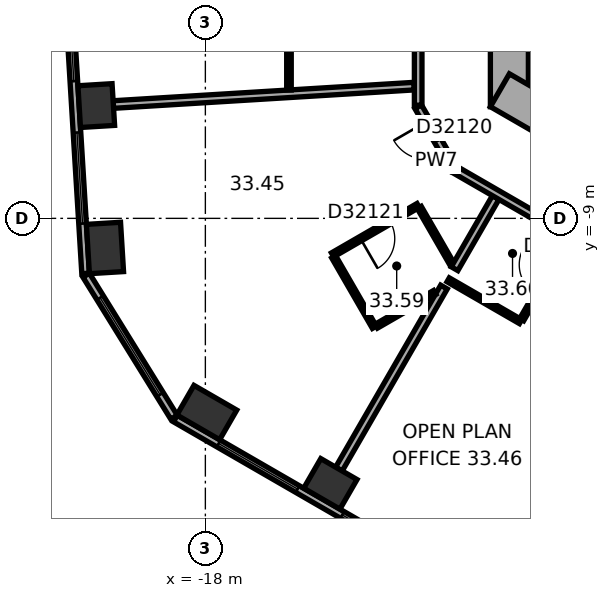
"""IFC4 building model, lengths in metres.
Left out: names, types, materials, properties, quantities, classifications, styles, units other than length and angle.
Written with IfcOpenShell. Run it as: python <this file> out.ifc"""

import sys

from ifc_helpers import new_model, si_unit, direction, frame, frame_2d, origin, origin_2d, place, context, subcontext, project, spatial, rectangle, extrude, element, fill, save


model = new_model("IFC4")
c1 = context("Model", 3, precision=1e-05, world=origin(), true_north=direction((0.0, 1.0)))
c2 = subcontext(c1, "Body", "Model", "MODEL_VIEW")
j1 = project(units=[si_unit("LENGTHUNIT", "METRE"), si_unit("PLANEANGLEUNIT", "RADIAN")], contexts=[c1])
p1 = place(None, origin())
s1 = spatial("IfcSite", under=j1, at=p1, CompositionType="ELEMENT")
p2 = place(p1, origin())
s2 = spatial("IfcBuilding", under=s1, at=p2, CompositionType="ELEMENT")
p3 = place(p2, frame((0.0, 0.0, 135.5)))
s3 = spatial("IfcBuildingStorey", under=s2, at=p3, CompositionType="ELEMENT", Elevation=135.5)
p4 = place(p3, frame((-20.871, -6.032, 0.0), z_axis=(0.0, 0.0, 1.0), x_axis=(0.061048539535, -0.998134798422, 0.0)))
e1 = element("IfcColumn", 1, at=p4, inside=s3, PredefinedType="COLUMN", context=c2, shape_type="SweptSolid", body=[
    extrude(rectangle(XDim=1.1, YDim=0.9, at=origin_2d()), origin(), (0.0, 0.0, 1.0), 3.7),
])
for number, where, z_axis, x_axis in (
    (2, (-20.642, -9.779, 0.0), (0.0, 0.0, 1.0), (0.061, -0.998, 0.0)),
    (3, (-17.962, -14.109, 0.0), (0.0, 0.0, 1.0), (0.866, -0.5, 0.0)),
):
    element("IfcColumn", number, at=place(p3, frame(where, z_axis=z_axis, x_axis=x_axis)), inside=s3, PredefinedType="COLUMN", context=c2, shape_type="SweptSolid", body=[
        extrude(rectangle(XDim=1.3, YDim=0.9, at=origin_2d()), origin(), (0.0, 0.0, 1.0), 3.7),
    ])
p5 = place(p3, frame((-14.711, -15.986, 0.0), z_axis=(0.0, 0.0, 1.0), x_axis=(0.866025403784, -0.5, 0.0)))
e4 = element("IfcColumn", 4, at=p5, inside=s3, PredefinedType="COLUMN", context=c2, shape_type="SweptSolid", body=[
    extrude(rectangle(XDim=1.1, YDim=0.9, at=origin_2d()), origin(), (0.0, 0.0, 1.0), 3.7),
])
p6 = place(p3, frame((-10.0, 6.062, 0.0), z_axis=(0.0, 0.0, 1.0), x_axis=(0.0, -1.0, 0.0)))
e5 = element("IfcWall", 5, at=p6, inside=s3, PredefinedType="SHEAR", context=c2, shape_type="SweptSolid", body=[
    extrude(rectangle(XDim=12.125, YDim=1.0, at=frame_2d((6.062, 0.0))), origin(), (0.0, 0.0, 1.0), 3.7),
])
p7 = place(p3, frame((-10.25, -5.629, 0.0), z_axis=(0.0, 0.0, 1.0), x_axis=(0.866022616891, -0.50000482701, 0.0)))
e6 = element("IfcWall", 6, at=p7, inside=s3, PredefinedType="SHEAR", context=c2, shape_type="SweptSolid", body=[
    extrude(rectangle(XDim=12.125, YDim=1.0, at=frame_2d((6.062, 0.0))), origin(), (0.0, 0.0, 1.0), 3.7),
])
p8 = place(p7, frame((6.262, 0.0, 0.0)))
e7 = element("IfcOpeningElement", 7, at=p8, cuts=e6, PredefinedType="OPENING", context=c2, shape_type="SweptSolid", body=[
    extrude(rectangle(XDim=1.5, YDim=2.1, at=frame_2d((0.75, 1.05))), frame((0.0, 0.51, 0.0), z_axis=(0.0, -1.0, 0.0), x_axis=(1.0, 0.0, 0.0)), (0.0, 0.0, 1.0), 1.02),
])
p9 = place(p3, frame((-22.375, 9.557, 0.0), z_axis=(0.0, 0.0, 1.0), x_axis=(0.061036015339, -0.998135564356, 0.0)))
e8 = element("IfcWall", 8, at=p9, inside=s3, PredefinedType="STANDARD", context=c2, shape_type="SweptSolid", body=[
    extrude(rectangle(XDim=20.044, YDim=0.2, at=frame_2d((10.022, 0.0))), origin(), (0.0, 0.0, 1.0), 3.7),
])
p10 = place(p9, frame((1.313, 0.0, 0.9)))
e9 = element("IfcOpeningElement", 9, at=p10, cuts=e8, PredefinedType="OPENING", context=c2, shape_type="SweptSolid", body=[
    extrude(rectangle(XDim=2.4, YDim=2.0, at=frame_2d((1.2, 1.0))), frame((0.0, 0.11, 0.0), z_axis=(0.0, -1.0, 0.0), x_axis=(1.0, 0.0, 0.0)), (0.0, 0.0, 1.0), 0.22),
])
p11 = place(p9, frame((5.067, 0.0, 0.9)))
e10 = element("IfcOpeningElement", 10, at=p11, cuts=e8, PredefinedType="OPENING", context=c2, shape_type="SweptSolid", body=[
    extrude(rectangle(XDim=2.4, YDim=2.0, at=frame_2d((1.2, 1.0))), frame((0.0, 0.11, 0.0), z_axis=(0.0, -1.0, 0.0), x_axis=(1.0, 0.0, 0.0)), (0.0, 0.0, 1.0), 0.22),
])
p12 = place(p9, frame((8.821, 0.0, 0.9)))
e11 = element("IfcOpeningElement", 11, at=p12, cuts=e8, PredefinedType="OPENING", context=c2, shape_type="SweptSolid", body=[
    extrude(rectangle(XDim=2.4, YDim=2.0, at=frame_2d((1.2, 1.0))), frame((0.0, 0.11, 0.0), z_axis=(0.0, -1.0, 0.0), x_axis=(1.0, 0.0, 0.0)), (0.0, 0.0, 1.0), 0.22),
])
p13 = place(p9, frame((12.575, 0.0, 0.9)))
e12 = element("IfcOpeningElement", 12, at=p13, cuts=e8, PredefinedType="OPENING", context=c2, shape_type="SweptSolid", body=[
    extrude(rectangle(XDim=2.4, YDim=2.0, at=frame_2d((1.2, 1.0))), frame((0.0, 0.11, 0.0), z_axis=(0.0, -1.0, 0.0), x_axis=(1.0, 0.0, 0.0)), (0.0, 0.0, 1.0), 0.22),
])
p14 = place(p9, frame((16.329, 0.0, 0.9)))
e13 = element("IfcOpeningElement", 13, at=p14, cuts=e8, PredefinedType="OPENING", context=c2, shape_type="SweptSolid", body=[
    extrude(rectangle(XDim=2.4, YDim=2.0, at=frame_2d((1.2, 1.0))), frame((0.0, 0.11, 0.0), z_axis=(0.0, -1.0, 0.0), x_axis=(1.0, 0.0, 0.0)), (0.0, 0.0, 1.0), 0.22),
])
p15 = place(p3, frame((-21.137, -10.496, 0.0), z_axis=(0.0, 0.0, 1.0), x_axis=(0.526178661629, -0.850374044786, 0.0)))
e14 = element("IfcWall", 14, at=p15, inside=s3, PredefinedType="STANDARD", context=c2, shape_type="SweptSolid", body=[
    extrude(rectangle(XDim=4.395, YDim=0.2, at=frame_2d((2.197, 0.0))), origin(), (0.0, 0.0, 1.0), 3.7),
])
p16 = place(p15, frame((0.698, 0.0, 0.9)))
e15 = element("IfcOpeningElement", 15, at=p16, cuts=e14, PredefinedType="OPENING", context=c2, shape_type="SweptSolid", body=[
    extrude(rectangle(XDim=3.0, YDim=2.0, at=frame_2d((1.5, 1.0))), frame((0.0, 0.11, 0.0), z_axis=(0.0, -1.0, 0.0), x_axis=(1.0, 0.0, 0.0)), (0.0, 0.0, 1.0), 0.22),
])
p17 = place(p3, frame((-18.789, -14.267, 0.0), z_axis=(0.0, 0.0, 1.0), x_axis=(0.866023315909, -0.500003616288, 0.0)))
e16 = element("IfcWall", 16, at=p17, inside=s3, PredefinedType="STANDARD", context=c2, shape_type="SweptSolid", body=[
    extrude(rectangle(XDim=20.044, YDim=0.2, at=frame_2d((10.022, 0.0))), origin(), (0.0, 0.0, 1.0), 3.7),
])
p18 = place(p17, frame((1.314, 0.0, 0.9)))
e17 = element("IfcOpeningElement", 17, at=p18, cuts=e16, PredefinedType="OPENING", context=c2, shape_type="SweptSolid", body=[
    extrude(rectangle(XDim=2.4, YDim=2.0, at=frame_2d((1.2, 1.0))), frame((0.0, 0.11, 0.0), z_axis=(0.0, -1.0, 0.0), x_axis=(1.0, 0.0, 0.0)), (0.0, 0.0, 1.0), 0.22),
])
p19 = place(p17, frame((5.069, 0.0, 0.9)))
e18 = element("IfcOpeningElement", 18, at=p19, cuts=e16, PredefinedType="OPENING", context=c2, shape_type="SweptSolid", body=[
    extrude(rectangle(XDim=2.4, YDim=2.0, at=frame_2d((1.2, 1.0))), frame((0.0, 0.11, 0.0), z_axis=(0.0, -1.0, 0.0), x_axis=(1.0, 0.0, 0.0)), (0.0, 0.0, 1.0), 0.22),
])
p20 = place(p17, frame((8.823, 0.0, 0.9)))
e19 = element("IfcOpeningElement", 19, at=p20, cuts=e16, PredefinedType="OPENING", context=c2, shape_type="SweptSolid", body=[
    extrude(rectangle(XDim=2.4, YDim=2.0, at=frame_2d((1.2, 1.0))), frame((0.0, 0.11, 0.0), z_axis=(0.0, -1.0, 0.0), x_axis=(1.0, 0.0, 0.0)), (0.0, 0.0, 1.0), 0.22),
])
p21 = place(p17, frame((12.577, 0.0, 0.9)))
e20 = element("IfcOpeningElement", 20, at=p21, cuts=e16, PredefinedType="OPENING", context=c2, shape_type="SweptSolid", body=[
    extrude(rectangle(XDim=2.4, YDim=2.0, at=frame_2d((1.2, 1.0))), frame((0.0, 0.11, 0.0), z_axis=(0.0, -1.0, 0.0), x_axis=(1.0, 0.0, 0.0)), (0.0, 0.0, 1.0), 0.22),
])
p22 = place(p17, frame((16.331, 0.0, 0.9)))
e21 = element("IfcOpeningElement", 21, at=p22, cuts=e16, PredefinedType="OPENING", context=c2, shape_type="SweptSolid", body=[
    extrude(rectangle(XDim=2.4, YDim=2.0, at=frame_2d((1.2, 1.0))), frame((0.0, 0.11, 0.0), z_axis=(0.0, -1.0, 0.0), x_axis=(1.0, 0.0, 0.0)), (0.0, 0.0, 1.0), 0.22),
])
p23 = place(p3, frame((-20.421, -6.005, 0.0), z_axis=(0.0, 0.0, 1.0), x_axis=(0.998134865741, 0.061047438866, 0.0)))
e22 = element("IfcWall", 22, at=p23, inside=s3, PredefinedType="PARTITIONING", context=c2, shape_type="SweptSolid", body=[
    extrude(rectangle(XDim=7.927, YDim=0.2, at=frame_2d((3.963, 0.0))), origin(), (0.0, 0.0, 1.0), 2.55),
])
p24 = place(p3, frame((-15.8, -5.622, 0.0), z_axis=(0.0, 0.0, 1.0), x_axis=(0.0, 1.0, 0.0)))
e23 = element("IfcWall", 23, at=p24, inside=s3, PredefinedType="PARTITIONING", context=c2, shape_type="SweptSolid", body=[
    extrude(rectangle(XDim=3.308, YDim=0.12, at=frame_2d((1.654, 0.0))), origin(), (0.0, 0.0, 1.0), 3.35),
])
p25 = place(p3, frame((-14.653, -9.961, 0.0), z_axis=(0.0, 0.0, 1.0), x_axis=(0.866021400173, 0.500006934395, 0.0)))
e24 = element("IfcWall", 24, at=p25, inside=s3, PredefinedType="PARTITIONING", context=c2, shape_type="SweptSolid", body=[
    extrude(rectangle(XDim=2.6, YDim=0.12, at=frame_2d((1.3, 0.0))), origin(), (0.0, 0.0, 1.0), 3.35),
])
p26 = place(p25, frame((0.85, 0.0, 0.0)))
e25 = element("IfcOpeningElement", 25, at=p26, cuts=e24, PredefinedType="OPENING", context=c2, shape_type="SweptSolid", body=[
    extrude(rectangle(XDim=0.9, YDim=2.1, at=frame_2d((0.45, 1.05))), frame((0.0, 0.07, 0.0), z_axis=(0.0, -1.0, 0.0), x_axis=(1.0, 0.0, 0.0)), (0.0, 0.0, 1.0), 0.14),
])
p27 = place(p3, frame((-14.486, -15.597, 0.0), z_axis=(0.0, 0.0, 1.0), x_axis=(0.500003965547, 0.866023114263, 0.0)))
e26 = element("IfcWall", 26, at=p27, inside=s3, PredefinedType="PARTITIONING", context=c2, shape_type="SweptSolid", body=[
    extrude(rectangle(XDim=5.53, YDim=0.2, at=frame_2d((2.765, 0.0))), origin(), (0.0, 0.0, 1.0), 3.35),
])
p28 = place(p3, frame((-13.552, -11.866, 0.0), z_axis=(0.0, 0.0, 1.0), x_axis=(-0.500028586798, 0.86600889856, 0.0)))
e27 = element("IfcWall", 27, at=p28, inside=s3, PredefinedType="PARTITIONING", context=c2, shape_type="SweptSolid", body=[
    extrude(rectangle(XDim=2.14, YDim=0.12, at=frame_2d((1.07, 0.0))), origin(), (0.0, 0.0, 1.0), 3.35),
])
p29 = place(p3, frame((-12.4, -6.062, 0.0), z_axis=(0.0, 0.0, 1.0), x_axis=(0.500022797313, -0.86601224135, 0.0)))
e28 = element("IfcWall", 28, at=p29, inside=s3, PredefinedType="PARTITIONING", context=c2, shape_type="SweptSolid", body=[
    extrude(rectangle(XDim=1.9, YDim=0.2, at=frame_2d((0.95, 0.0))), origin(), (0.0, 0.0, 1.0), 3.35),
])
p30 = place(p29, frame((0.45, 0.0, 0.0)))
e29 = element("IfcOpeningElement", 29, at=p30, cuts=e28, PredefinedType="OPENING", context=c2, shape_type="SweptSolid", body=[
    extrude(rectangle(XDim=1.0, YDim=2.1, at=frame_2d((0.5, 1.05))), frame((0.0, 0.11, 0.0), z_axis=(0.0, -1.0, 0.0), x_axis=(1.0, 0.0, 0.0)), (0.0, 0.0, 1.0), 0.22),
])
p31 = place(p3, frame((-12.4, 5.769, 0.0), z_axis=(0.0, 0.0, 1.0), x_axis=(0.0, -1.0, 0.0)))
e30 = element("IfcWall", 30, at=p31, inside=s3, PredefinedType="PARTITIONING", context=c2, shape_type="SweptSolid", body=[
    extrude(rectangle(XDim=11.792, YDim=0.2, at=frame_2d((5.896, 0.0))), origin(), (0.0, 0.0, 1.0), 3.35),
])
p32 = place(p31, frame((1.381, 0.0, 0.0)))
e31 = element("IfcOpeningElement", 31, at=p32, cuts=e30, PredefinedType="OPENING", context=c2, shape_type="SweptSolid", body=[
    extrude(rectangle(XDim=1.0, YDim=2.1, at=frame_2d((0.5, 1.05))), frame((0.0, 0.11, 0.0), z_axis=(0.0, -1.0, 0.0), x_axis=(1.0, 0.0, 0.0)), (0.0, 0.0, 1.0), 0.22),
])
p33 = place(p31, frame((5.397, 0.0, 0.0)))
e32 = element("IfcOpeningElement", 32, at=p33, cuts=e30, PredefinedType="OPENING", context=c2, shape_type="SweptSolid", body=[
    extrude(rectangle(XDim=1.0, YDim=2.1, at=frame_2d((0.5, 1.05))), frame((0.0, 0.11, 0.0), z_axis=(0.0, -1.0, 0.0), x_axis=(1.0, 0.0, 0.0)), (0.0, 0.0, 1.0), 0.22),
])
p34 = place(p3, frame((-12.371, -8.713, 0.0), z_axis=(0.0, 0.0, 1.0), x_axis=(0.499910907645, -0.86607683517, 0.0)))
e33 = element("IfcWall", 33, at=p34, inside=s3, PredefinedType="PARTITIONING", context=c2, shape_type="SweptSolid", body=[
    extrude(rectangle(XDim=1.719, YDim=0.12, at=frame_2d((0.86, 0.0))), origin(), (0.0, 0.0, 1.0), 3.35),
])
p35 = place(p3, frame((-11.964, -10.949, 0.0), z_axis=(0.0, 0.0, 1.0), x_axis=(-0.86600680221, -0.500032217487, 0.0)))
e34 = element("IfcWall", 34, at=p35, inside=s3, PredefinedType="PARTITIONING", context=c2, shape_type="SweptSolid", body=[
    extrude(rectangle(XDim=1.774, YDim=0.12, at=frame_2d((0.887, 0.0))), origin(), (0.0, 0.0, 1.0), 3.35),
])
p36 = place(p3, frame((-11.442, -10.325, 0.0), z_axis=(0.0, 0.0, 1.0), x_axis=(0.500012369163, 0.866018262327, 0.0)))
e35 = element("IfcWall", 35, at=p36, inside=s3, PredefinedType="PARTITIONING", context=c2, shape_type="SweptSolid", body=[
    extrude(rectangle(XDim=2.163, YDim=0.2, at=frame_2d((1.081, 0.0))), origin(), (0.0, 0.0, 1.0), 3.35),
])
p37 = place(p3, frame((-11.415, -7.728, 0.0), z_axis=(0.0, 0.0, 1.0), x_axis=(0.866022749921, -0.500004596598, 0.0)))
e36 = element("IfcWall", 36, at=p37, inside=s3, PredefinedType="PARTITIONING", context=c2, shape_type="SweptSolid", body=[
    extrude(rectangle(XDim=12.084, YDim=0.2, at=frame_2d((6.042, 0.0))), origin(), (0.0, 0.0, 1.0), 3.35),
])
p38 = place(p37, frame((5.58, 0.0, 0.0)))
e37 = element("IfcOpeningElement", 37, at=p38, cuts=e36, PredefinedType="OPENING", context=c2, shape_type="SweptSolid", body=[
    extrude(rectangle(XDim=1.0, YDim=2.1, at=frame_2d((0.5, 1.05))), frame((0.0, 0.11, 0.0), z_axis=(0.0, -1.0, 0.0), x_axis=(1.0, 0.0, 0.0)), (0.0, 0.0, 1.0), 0.22),
])
p39 = place(p3, frame((-9.706, -11.717, 0.0), z_axis=(0.0, 0.0, 1.0), x_axis=(-0.86598042715, 0.500077893725, 0.0)))
e38 = element("IfcWall", 38, at=p39, inside=s3, PredefinedType="PARTITIONING", context=c2, shape_type="SweptSolid", body=[
    extrude(rectangle(XDim=2.2, YDim=0.12, at=frame_2d((1.1, 0.0))), origin(), (0.0, 0.0, 1.0), 3.35),
])
p40 = place(p3, frame((-8.456, -9.552, 0.0), z_axis=(0.0, 0.0, 1.0), x_axis=(-0.500002508028, -0.866023955769, 0.0)))
e39 = element("IfcWall", 39, at=p40, inside=s3, PredefinedType="PARTITIONING", context=c2, shape_type="SweptSolid", body=[
    extrude(rectangle(XDim=2.44, YDim=0.12, at=frame_2d((1.22, 0.0))), origin(), (0.0, 0.0, 1.0), 3.35),
])
p41 = place(p40, frame((0.77, 0.0, 0.0)))
e40 = element("IfcOpeningElement", 40, at=p41, cuts=e39, PredefinedType="OPENING", context=c2, shape_type="SweptSolid", body=[
    extrude(rectangle(XDim=0.9, YDim=2.1, at=frame_2d((0.45, 1.05))), frame((0.0, 0.07, 0.0), z_axis=(0.0, -1.0, 0.0), x_axis=(1.0, 0.0, 0.0)), (0.0, 0.0, 1.0), 0.14),
])
p42 = place(p13, origin())
e41 = element("IfcWindow", 41, at=p42, inside=s3, PartitioningType="SINGLE_PANEL", PredefinedType="WINDOW", context=c2, shape_type="SweptSolid", body=[
    extrude(rectangle(XDim=2.4, YDim=2.0, at=frame_2d((1.2, 1.0))), frame((0.0, 0.03, 0.0), z_axis=(0.0, -1.0, 0.0), x_axis=(1.0, 0.0, 0.0)), (0.0, 0.0, 1.0), 0.06),
])
fill(e12, e41)
p43 = place(p14, origin())
e42 = element("IfcWindow", 42, at=p43, inside=s3, PartitioningType="SINGLE_PANEL", PredefinedType="WINDOW", context=c2, shape_type="SweptSolid", body=[
    extrude(rectangle(XDim=2.4, YDim=2.0, at=frame_2d((1.2, 1.0))), frame((0.0, 0.03, 0.0), z_axis=(0.0, -1.0, 0.0), x_axis=(1.0, 0.0, 0.0)), (0.0, 0.0, 1.0), 0.06),
])
fill(e13, e42)
p44 = place(p16, origin())
e43 = element("IfcWindow", 43, at=p44, inside=s3, PartitioningType="SINGLE_PANEL", PredefinedType="WINDOW", context=c2, shape_type="SweptSolid", body=[
    extrude(rectangle(XDim=3.0, YDim=2.0, at=frame_2d((1.5, 1.0))), frame((0.0, 0.03, 0.0), z_axis=(0.0, -1.0, 0.0), x_axis=(1.0, 0.0, 0.0)), (0.0, 0.0, 1.0), 0.06),
])
fill(e15, e43)
p45 = place(p18, origin())
e44 = element("IfcWindow", 44, at=p45, inside=s3, PartitioningType="SINGLE_PANEL", PredefinedType="WINDOW", context=c2, shape_type="SweptSolid", body=[
    extrude(rectangle(XDim=2.4, YDim=2.0, at=frame_2d((1.2, 1.0))), frame((0.0, 0.03, 0.0), z_axis=(0.0, -1.0, 0.0), x_axis=(1.0, 0.0, 0.0)), (0.0, 0.0, 1.0), 0.06),
])
fill(e17, e44)
p46 = place(p19, origin())
e45 = element("IfcWindow", 45, at=p46, inside=s3, PartitioningType="SINGLE_PANEL", PredefinedType="WINDOW", context=c2, shape_type="SweptSolid", body=[
    extrude(rectangle(XDim=2.4, YDim=2.0, at=frame_2d((1.2, 1.0))), frame((0.0, 0.03, 0.0), z_axis=(0.0, -1.0, 0.0), x_axis=(1.0, 0.0, 0.0)), (0.0, 0.0, 1.0), 0.06),
])
fill(e18, e45)
p47 = place(p30, origin())
e46 = element("IfcDoor", 46, at=p47, inside=s3, OperationType="SINGLE_SWING_LEFT", PredefinedType="DOOR", context=c2, shape_type="SweptSolid", body=[
    extrude(rectangle(XDim=1.0, YDim=2.1, at=frame_2d((0.5, 1.05))), frame((0.0, 0.025, 0.0), z_axis=(0.0, -1.0, 0.0), x_axis=(1.0, 0.0, 0.0)), (0.0, 0.0, 1.0), 0.05),
])
fill(e29, e46)
p48 = place(p26, origin())
e47 = element("IfcDoor", 47, at=p48, inside=s3, OperationType="SINGLE_SWING_LEFT", PredefinedType="DOOR", context=c2, shape_type="SweptSolid", body=[
    extrude(rectangle(XDim=0.9, YDim=2.1, at=frame_2d((0.45, 1.05))), frame((0.0, 0.025, 0.0), z_axis=(0.0, -1.0, 0.0), x_axis=(1.0, 0.0, 0.0)), (0.0, 0.0, 1.0), 0.05),
])
fill(e25, e47)
save(model, sys.argv[1])
